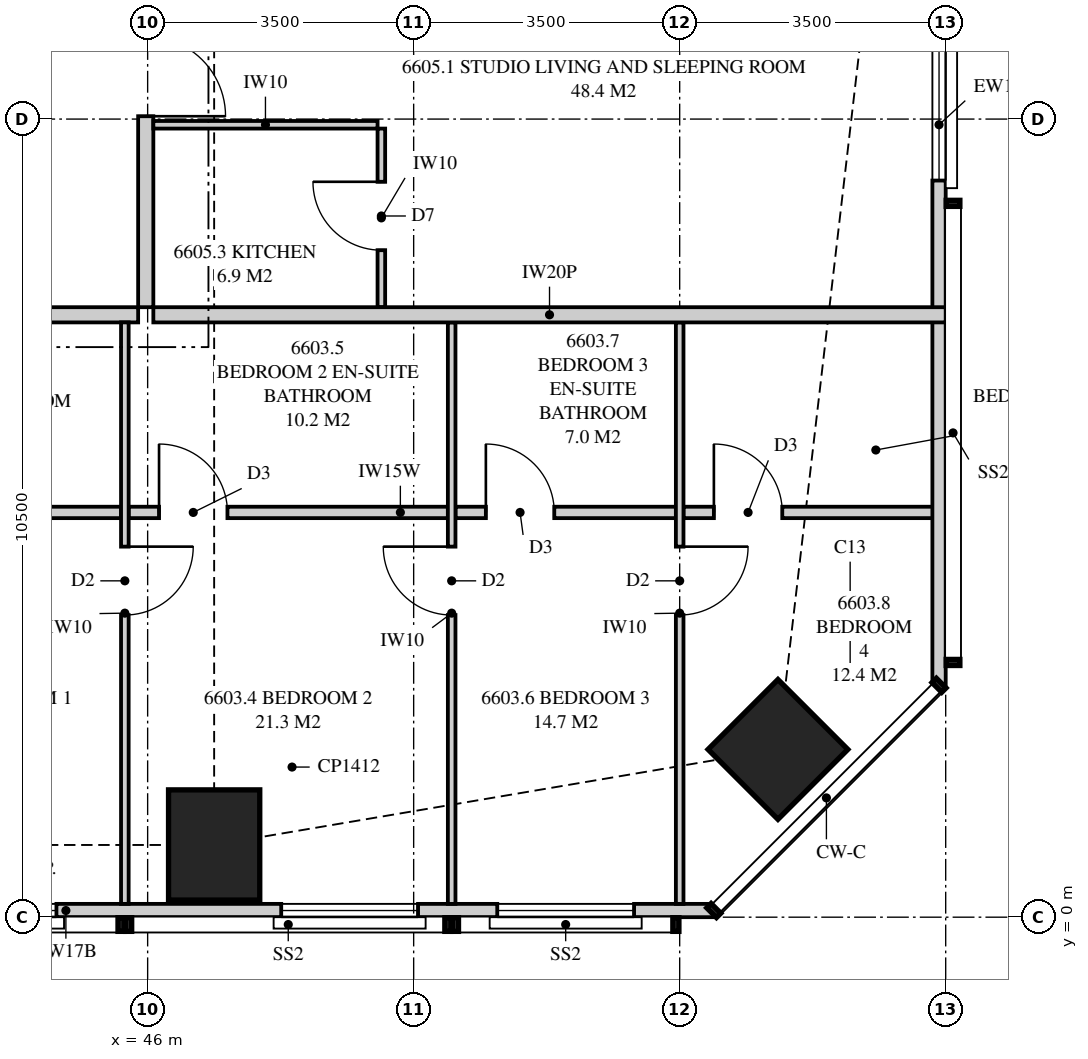
"""IFC4 building model, lengths in metres.
Left out: names, types, materials, properties, quantities, classifications, styles, units other than length and angle.
Written with IfcOpenShell. Run it as: python <this file> out.ifc"""

import sys

from ifc_helpers import new_model, si_unit, direction, frame, frame_2d, origin, origin_2d, place, context, subcontext, project, spatial, polyline, rectangle, outline, extrude, element, fill, save


model = new_model("IFC4")
c1 = context("Model", 3, precision=1e-05, world=origin(), true_north=direction((0.0, 1.0)))
c2 = subcontext(c1, "Body", "Model", "MODEL_VIEW")
j1 = project(units=[si_unit("LENGTHUNIT", "METRE"), si_unit("PLANEANGLEUNIT", "RADIAN")], contexts=[c1])
p1 = place(None, origin())
s1 = spatial("IfcSite", under=j1, at=p1, CompositionType="ELEMENT")
p2 = place(p1, origin())
s2 = spatial("IfcBuilding", under=s1, at=p2, CompositionType="ELEMENT")
p3 = place(p2, frame((0.0, 0.0, 242.45)))
s3 = spatial("IfcBuildingStorey", under=s2, at=p3, CompositionType="ELEMENT", Elevation=242.45)
p4 = place(p3, frame((46.875, 0.95, 0.0), z_axis=(0.0, 0.0, 1.0), x_axis=(0.0, 1.0, 0.0)))
e1 = element("IfcColumn", 1, at=p4, inside=s3, PredefinedType="COLUMN", context=c2, shape_type="SweptSolid", body=[
    extrude(rectangle(XDim=1.45, YDim=1.2, at=origin_2d()), origin(), (0.0, 0.0, 1.0), 3.5),
])
p5 = place(p3, frame((54.293, 2.207, 0.0), z_axis=(0.0, 0.0, 1.0), x_axis=(0.707106781187, 0.707106781187, 0.0)))
e2 = element("IfcColumn", 2, at=p5, inside=s3, PredefinedType="COLUMN", context=c2, shape_type="SweptSolid", body=[
    extrude(rectangle(XDim=1.3, YDim=1.3, at=origin_2d()), origin(), (0.0, 0.0, 1.0), 3.5),
])
p6 = place(p3, frame((36.4, 0.087, 0.0), z_axis=(0.0, 0.0, 1.0), x_axis=(1.0, 0.0, 0.0)))
e3 = element("IfcWall", 3, at=p6, inside=s3, PredefinedType="SOLIDWALL", context=c2, shape_type="SweptSolid", body=[
    extrude(outline(polyline([(0.0, 0.0), (17.049, 0.0), (17.049, 3.26), (10.69, 3.26), (10.69, 2.3), (10.606, 2.3), (10.606, 3.26), (10.475, 3.26), (10.475, 2.3), (0.0, 2.3), (0.0, 0.0)])), frame((0.0, 0.087, 0.0), z_axis=(0.0, -1.0, 0.0), x_axis=(1.0, 0.0, 0.0)), (0.0, 0.0, 1.0), 0.175),
])
p7 = place(p6, frame((1.76, 0.0, 0.4)))
e4 = element("IfcOpeningElement", 4, at=p7, cuts=e3, PredefinedType="OPENING", context=c2, shape_type="SweptSolid", body=[
    extrude(rectangle(XDim=2.4, YDim=1.85, at=frame_2d((1.2, 0.925))), frame((0.0, 0.097, 0.0), z_axis=(0.0, -1.0, 0.0), x_axis=(1.0, 0.0, 0.0)), (0.0, 0.0, 1.0), 0.195),
])
p8 = place(p6, frame((6.6, 0.0, 0.4)))
e5 = element("IfcOpeningElement", 5, at=p8, cuts=e3, PredefinedType="OPENING", context=c2, shape_type="SweptSolid", body=[
    extrude(rectangle(XDim=1.8, YDim=1.85, at=frame_2d((0.9, 0.925))), frame((0.0, 0.097, 0.0), z_axis=(0.0, -1.0, 0.0), x_axis=(1.0, 0.0, 0.0)), (0.0, 0.0, 1.0), 0.195),
])
p9 = place(p6, frame((11.357, 0.0, 0.4)))
e6 = element("IfcOpeningElement", 6, at=p9, cuts=e3, PredefinedType="OPENING", context=c2, shape_type="SweptSolid", body=[
    extrude(rectangle(XDim=1.8, YDim=1.85, at=frame_2d((0.9, 0.925))), frame((0.0, 0.097, 0.0), z_axis=(0.0, -1.0, 0.0), x_axis=(1.0, 0.0, 0.0)), (0.0, 0.0, 1.0), 0.195),
])
p10 = place(p6, frame((14.2, 0.0, 0.4)))
e7 = element("IfcOpeningElement", 7, at=p10, cuts=e3, PredefinedType="OPENING", context=c2, shape_type="SweptSolid", body=[
    extrude(rectangle(XDim=1.8, YDim=1.85, at=frame_2d((0.9, 0.925))), frame((0.0, 0.097, 0.0), z_axis=(0.0, -1.0, 0.0), x_axis=(1.0, 0.0, 0.0)), (0.0, 0.0, 1.0), 0.195),
])
p11 = place(p3, frame((56.413, 3.051, 0.0), z_axis=(0.0, 0.0, 1.0), x_axis=(0.0, 1.0, 0.0)))
e8 = element("IfcWall", 8, at=p11, inside=s3, PredefinedType="SOLIDWALL", context=c2, shape_type="SweptSolid", body=[
    extrude(outline(polyline([(0.0, 0.0), (14.749, 0.0), (14.749, 2.3), (9.949, 2.3), (9.949, 3.26), (9.858, 3.26), (9.858, 2.3), (9.688, 2.3), (9.688, 3.26), (0.0, 3.26), (0.0, 0.0)])), frame((0.0, 0.087, 0.0), z_axis=(0.0, -1.0, 0.0), x_axis=(1.0, 0.0, 0.0)), (0.0, 0.0, 1.0), 0.175),
])
p12 = place(p11, frame((6.64, 0.0, 0.4)))
e9 = element("IfcOpeningElement", 9, at=p12, cuts=e8, PredefinedType="OPENING", context=c2, shape_type="SweptSolid", body=[
    extrude(rectangle(XDim=2.4, YDim=1.85, at=frame_2d((1.2, 0.925))), frame((0.0, 0.097, 0.0), z_axis=(0.0, -1.0, 0.0), x_axis=(1.0, 0.0, 0.0)), (0.0, 0.0, 1.0), 0.195),
])
p13 = place(p11, frame((11.999, 0.0, 0.4)))
e10 = element("IfcOpeningElement", 10, at=p13, cuts=e8, PredefinedType="OPENING", context=c2, shape_type="SweptSolid", body=[
    extrude(rectangle(XDim=1.8, YDim=1.85, at=frame_2d((0.9, 0.925))), frame((0.0, 0.097, 0.0), z_axis=(0.0, -1.0, 0.0), x_axis=(1.0, 0.0, 0.0)), (0.0, 0.0, 1.0), 0.195),
])
p14 = place(p3, frame((36.55, 7.925, 0.0), z_axis=(0.0, 0.0, 1.0), x_axis=(1.0, 0.0, 0.0)))
e11 = element("IfcWall", 11, at=p14, inside=s3, PredefinedType="PARTITIONING", context=c2, shape_type="SweptSolid", body=[
    extrude(outline(polyline([(0.0, 0.0), (9.325, 0.0), (9.325, 3.26), (9.325, 2.66), (9.015, 2.66), (9.015, 3.26), (2.01, 3.26), (2.01, 2.66), (0.0, 2.66), (0.0, 3.26), (0.0, 0.0)])), frame((0.0, 0.1, 0.0), z_axis=(0.0, -1.0, 0.0), x_axis=(1.0, 0.0, 0.0)), (0.0, 0.0, 1.0), 0.2),
])
p15 = place(p14, frame((4.15, 0.0, 0.0)))
e12 = element("IfcOpeningElement", 12, at=p15, cuts=e11, PredefinedType="OPENING", context=c2, shape_type="SweptSolid", body=[
    extrude(rectangle(XDim=1.05, YDim=2.2, at=frame_2d((0.525, 1.1))), frame((0.0, 0.11, 0.0), z_axis=(0.0, -1.0, 0.0), x_axis=(1.0, 0.0, 0.0)), (0.0, 0.0, 1.0), 0.22),
])
p16 = place(p3, frame((45.7, 0.175, 0.0), z_axis=(0.0, 0.0, 1.0), x_axis=(0.0, 1.0, 0.0)))
e13 = element("IfcWall", 13, at=p16, inside=s3, PredefinedType="PARTITIONING", context=c2, shape_type="SweptSolid", body=[
    extrude(outline(polyline([(0.0, 0.0), (7.65, 0.0), (7.65, 3.26), (7.65, 2.66), (1.635, 2.66), (1.635, 2.3), (0.0, 2.3), (0.0, 3.26), (0.0, 0.0)])), frame((0.0, 0.05, 0.0), z_axis=(0.0, -1.0, 0.0), x_axis=(1.0, 0.0, 0.0)), (0.0, 0.0, 1.0), 0.1),
])
p17 = place(p16, frame((3.8, 0.0, 0.0)))
e14 = element("IfcOpeningElement", 14, at=p17, cuts=e13, PredefinedType="OPENING", context=c2, shape_type="SweptSolid", body=[
    extrude(rectangle(XDim=0.9, YDim=2.1, at=frame_2d((0.45, 1.05))), frame((0.0, 0.06, 0.0), z_axis=(0.0, -1.0, 0.0), x_axis=(1.0, 0.0, 0.0)), (0.0, 0.0, 1.0), 0.12),
])
p18 = place(p3, frame((50.0, 0.175, 0.0), z_axis=(0.0, 0.0, 1.0), x_axis=(0.0, 1.0, 0.0)))
e15 = element("IfcWall", 15, at=p18, inside=s3, PredefinedType="PARTITIONING", context=c2, shape_type="SweptSolid", body=[
    extrude(outline(polyline([(0.0, 0.0), (7.65, 0.0), (7.65, 3.26), (2.177, 3.26), (2.177, 2.3), (0.432, 2.3), (0.432, 3.26), (0.0, 3.26), (0.0, 0.0)])), frame((0.0, 0.05, 0.0), z_axis=(0.0, -1.0, 0.0), x_axis=(1.0, 0.0, 0.0)), (0.0, 0.0, 1.0), 0.1),
])
p19 = place(p18, frame((3.8, 0.0, 0.0)))
e16 = element("IfcOpeningElement", 16, at=p19, cuts=e15, PredefinedType="OPENING", context=c2, shape_type="SweptSolid", body=[
    extrude(rectangle(XDim=0.9, YDim=2.1, at=frame_2d((0.45, 1.05))), frame((0.0, 0.06, 0.0), z_axis=(0.0, -1.0, 0.0), x_axis=(1.0, 0.0, 0.0)), (0.0, 0.0, 1.0), 0.12),
])
p20 = place(p3, frame((53.0, 0.175, 0.0), z_axis=(0.0, 0.0, 1.0), x_axis=(0.0, 1.0, 0.0)))
e17 = element("IfcWall", 17, at=p20, inside=s3, PredefinedType="PARTITIONING", context=c2, shape_type="SweptSolid", body=[
    extrude(outline(polyline([(0.0, 0.0), (7.65, 0.0), (7.65, 3.26), (2.685, 3.26), (2.685, 2.3), (0.941, 2.3), (0.941, 3.26), (0.0, 3.26), (0.0, 0.0)])), frame((0.0, 0.05, 0.0), z_axis=(0.0, -1.0, 0.0), x_axis=(1.0, 0.0, 0.0)), (0.0, 0.0, 1.0), 0.1),
])
p21 = place(p20, frame((3.8, 0.0, 0.0)))
e18 = element("IfcOpeningElement", 18, at=p21, cuts=e17, PredefinedType="OPENING", context=c2, shape_type="SweptSolid", body=[
    extrude(rectangle(XDim=0.9, YDim=2.1, at=frame_2d((0.45, 1.05))), frame((0.0, 0.06, 0.0), z_axis=(0.0, -1.0, 0.0), x_axis=(1.0, 0.0, 0.0)), (0.0, 0.0, 1.0), 0.12),
])
p22 = place(p3, frame((42.15, 5.325, 0.0), z_axis=(0.0, 0.0, 1.0), x_axis=(1.0, 0.0, 0.0)))
e19 = element("IfcWall", 19, at=p22, inside=s3, PredefinedType="PLUMBINGWALL", context=c2, shape_type="SweptSolid", body=[
    extrude(outline(polyline([(0.0, 0.0), (3.5, 0.0), (3.5, 3.26), (3.5, 2.66), (3.44, 2.66), (3.44, 3.26), (0.0, 3.26), (0.0, 0.0)])), frame((0.0, 0.075, 0.0), z_axis=(0.0, -1.0, 0.0), x_axis=(1.0, 0.0, 0.0)), (0.0, 0.0, 1.0), 0.15),
])
p23 = place(p3, frame((45.75, 5.325, 0.0), z_axis=(0.0, 0.0, 1.0), x_axis=(1.0, 0.0, 0.0)))
e20 = element("IfcWall", 20, at=p23, inside=s3, PredefinedType="PLUMBINGWALL", context=c2, shape_type="SweptSolid", body=[
    extrude(outline(polyline([(0.0, 0.0), (4.2, 0.0), (4.2, 3.26), (2.41, 3.26), (2.41, 2.66), (0.0, 2.66), (0.0, 3.26), (0.0, 0.0)])), frame((0.0, 0.075, 0.0), z_axis=(0.0, -1.0, 0.0), x_axis=(1.0, 0.0, 0.0)), (0.0, 0.0, 1.0), 0.15),
])
p24 = place(p23, frame((0.4, 0.0, 0.0)))
e21 = element("IfcOpeningElement", 21, at=p24, cuts=e20, PredefinedType="OPENING", context=c2, shape_type="SweptSolid", body=[
    extrude(rectangle(XDim=0.9, YDim=2.1, at=frame_2d((0.45, 1.05))), frame((0.0, 0.085, 0.0), z_axis=(0.0, -1.0, 0.0), x_axis=(1.0, 0.0, 0.0)), (0.0, 0.0, 1.0), 0.17),
])
p25 = place(p3, frame((50.05, 5.325, 0.0), z_axis=(0.0, 0.0, 1.0), x_axis=(1.0, 0.0, 0.0)))
e22 = element("IfcWall", 22, at=p25, inside=s3, PredefinedType="PLUMBINGWALL", context=c2, shape_type="SweptSolid", body=[
    extrude(rectangle(XDim=2.9, YDim=0.15, at=frame_2d((1.45, 0.0))), origin(), (0.0, 0.0, 1.0), 3.26),
])
p26 = place(p25, frame((0.4, 0.0, 0.0)))
e23 = element("IfcOpeningElement", 23, at=p26, cuts=e22, PredefinedType="OPENING", context=c2, shape_type="SweptSolid", body=[
    extrude(rectangle(XDim=0.9, YDim=2.1, at=frame_2d((0.45, 1.05))), frame((0.0, 0.085, 0.0), z_axis=(0.0, -1.0, 0.0), x_axis=(1.0, 0.0, 0.0)), (0.0, 0.0, 1.0), 0.17),
])
p27 = place(p3, frame((53.05, 5.325, 0.0), z_axis=(0.0, 0.0, 1.0), x_axis=(1.0, 0.0, 0.0)))
e24 = element("IfcWall", 24, at=p27, inside=s3, PredefinedType="PLUMBINGWALL", context=c2, shape_type="SweptSolid", body=[
    extrude(outline(polyline([(0.0, 0.0), (3.45, 0.0), (3.45, 3.26), (2.497, 3.26), (2.497, 2.3), (0.715, 2.3), (0.715, 3.26), (0.0, 3.26), (0.0, 0.0)])), frame((0.0, 0.075, 0.0), z_axis=(0.0, -1.0, 0.0), x_axis=(1.0, 0.0, 0.0)), (0.0, 0.0, 1.0), 0.15),
])
p28 = place(p27, frame((0.4, 0.0, 0.0)))
e25 = element("IfcOpeningElement", 25, at=p28, cuts=e24, PredefinedType="OPENING", context=c2, shape_type="SweptSolid", body=[
    extrude(rectangle(XDim=0.9, YDim=2.1, at=frame_2d((0.45, 1.05))), frame((0.0, 0.085, 0.0), z_axis=(0.0, -1.0, 0.0), x_axis=(1.0, 0.0, 0.0)), (0.0, 0.0, 1.0), 0.17),
])
p29 = place(p3, frame((46.075, 7.925, 0.0), z_axis=(0.0, 0.0, 1.0), x_axis=(1.0, 0.0, 0.0)))
e26 = element("IfcWall", 26, at=p29, inside=s3, PredefinedType="PARTITIONING", context=c2, shape_type="SweptSolid", body=[
    extrude(outline(polyline([(0.0, 0.0), (10.425, 0.0), (10.425, 3.26), (9.8, 3.26), (9.8, 2.3), (7.968, 2.3), (7.968, 3.26), (2.11, 3.26), (2.11, 2.66), (0.0, 2.66), (0.0, 3.26), (0.0, 0.0)])), frame((0.0, 0.1, 0.0), z_axis=(0.0, -1.0, 0.0), x_axis=(1.0, 0.0, 0.0)), (0.0, 0.0, 1.0), 0.2),
])
p30 = place(p3, frame((45.975, 8.025, 0.0), z_axis=(0.0, 0.0, 1.0), x_axis=(0.0, 1.0, 0.0)))
e27 = element("IfcWall", 27, at=p30, inside=s3, PredefinedType="PARTITIONING", context=c2, shape_type="SweptSolid", body=[
    extrude(outline(polyline([(0.0, 0.0), (6.025, 0.0), (6.025, 3.26), (6.025, 2.66), (5.085, 2.66), (0.0, 2.66), (0.0, 3.26), (0.0, 0.0)])), frame((0.0, 0.1, 0.0), z_axis=(0.0, -1.0, 0.0), x_axis=(1.0, 0.0, 0.0)), (0.0, 0.0, 1.0), 0.2),
])
p31 = place(p30, frame((2.512, 0.0, 0.0)))
e28 = element("IfcOpeningElement", 28, at=p31, cuts=e27, PredefinedType="OPENING", context=c2, shape_type="SweptSolid", body=[
    extrude(rectangle(XDim=1.05, YDim=2.2, at=frame_2d((0.525, 1.1))), frame((0.0, 0.11, 0.0), z_axis=(0.0, -1.0, 0.0), x_axis=(1.0, 0.0, 0.0)), (0.0, 0.0, 1.0), 0.22),
])
p32 = place(p3, frame((49.075, 8.025, 0.0), z_axis=(0.0, 0.0, 1.0), x_axis=(0.0, 1.0, 0.0)))
e29 = element("IfcWall", 29, at=p32, inside=s3, PredefinedType="PARTITIONING", context=c2, shape_type="SweptSolid", body=[
    extrude(rectangle(XDim=2.35, YDim=0.1, at=frame_2d((1.175, 0.0))), origin(), (0.0, 0.0, 1.0), 3.26),
])
p33 = place(p32, frame((0.75, 0.0, 0.0)))
e30 = element("IfcOpeningElement", 30, at=p33, cuts=e29, PredefinedType="OPENING", context=c2, shape_type="SweptSolid", body=[
    extrude(rectangle(XDim=0.9, YDim=2.1, at=frame_2d((0.45, 1.05))), frame((0.0, 0.06, 0.0), z_axis=(0.0, -1.0, 0.0), x_axis=(1.0, 0.0, 0.0)), (0.0, 0.0, 1.0), 0.12),
])
p34 = place(p3, frame((49.025, 10.425, 0.0), z_axis=(0.0, 0.0, 1.0), x_axis=(-1.0, 0.0, 0.0)))
e31 = element("IfcWall", 31, at=p34, inside=s3, PredefinedType="PARTITIONING", context=c2, shape_type="SweptSolid", body=[
    extrude(outline(polyline([(0.0, 0.0), (2.95, 0.0), (2.95, 3.26), (2.95, 2.66), (0.89, 2.66), (0.89, 3.26), (0.0, 3.26), (0.0, 0.0)])), frame((0.0, 0.05, 0.0), z_axis=(0.0, -1.0, 0.0), x_axis=(1.0, 0.0, 0.0)), (0.0, 0.0, 1.0), 0.1),
])
p35 = place(p8, origin())
e32 = element("IfcWindow", 32, at=p35, inside=s3, PartitioningType="SINGLE_PANEL", PredefinedType="WINDOW", context=c2, shape_type="SweptSolid", body=[
    extrude(rectangle(XDim=1.8, YDim=1.85, at=frame_2d((0.9, 0.925))), frame((0.0, 0.03, 0.0), z_axis=(0.0, -1.0, 0.0), x_axis=(1.0, 0.0, 0.0)), (0.0, 0.0, 1.0), 0.06),
])
fill(e5, e32)
p36 = place(p9, origin())
e33 = element("IfcWindow", 33, at=p36, inside=s3, PartitioningType="SINGLE_PANEL", PredefinedType="WINDOW", context=c2, shape_type="SweptSolid", body=[
    extrude(rectangle(XDim=1.8, YDim=1.85, at=frame_2d((0.9, 0.925))), frame((0.0, 0.03, 0.0), z_axis=(0.0, -1.0, 0.0), x_axis=(1.0, 0.0, 0.0)), (0.0, 0.0, 1.0), 0.06),
])
fill(e6, e33)
p37 = place(p10, origin())
e34 = element("IfcWindow", 34, at=p37, inside=s3, PartitioningType="SINGLE_PANEL", PredefinedType="WINDOW", context=c2, shape_type="SweptSolid", body=[
    extrude(rectangle(XDim=1.8, YDim=1.85, at=frame_2d((0.9, 0.925))), frame((0.0, 0.03, 0.0), z_axis=(0.0, -1.0, 0.0), x_axis=(1.0, 0.0, 0.0)), (0.0, 0.0, 1.0), 0.06),
])
fill(e7, e34)
p38 = place(p12, origin())
e35 = element("IfcWindow", 35, at=p38, inside=s3, PartitioningType="SINGLE_PANEL", PredefinedType="WINDOW", context=c2, shape_type="SweptSolid", body=[
    extrude(rectangle(XDim=2.4, YDim=1.85, at=frame_2d((1.2, 0.925))), frame((0.0, 0.03, 0.0), z_axis=(0.0, -1.0, 0.0), x_axis=(1.0, 0.0, 0.0)), (0.0, 0.0, 1.0), 0.06),
])
fill(e9, e35)
p39 = place(p17, frame((0.9, 0.0, 0.0), z_axis=(0.0, 0.0, 1.0), x_axis=(-1.0, 0.0, 0.0)))
e36 = element("IfcDoor", 36, at=p39, inside=s3, OperationType="SINGLE_SWING_LEFT", PredefinedType="DOOR", context=c2, shape_type="SweptSolid", body=[
    extrude(rectangle(XDim=0.9, YDim=2.1, at=frame_2d((0.45, 1.05))), frame((0.0, 0.025, 0.0), z_axis=(0.0, -1.0, 0.0), x_axis=(1.0, 0.0, 0.0)), (0.0, 0.0, 1.0), 0.05),
])
fill(e14, e36)
p40 = place(p24, origin())
e37 = element("IfcDoor", 37, at=p40, inside=s3, OperationType="SINGLE_SWING_LEFT", PredefinedType="DOOR", context=c2, shape_type="SweptSolid", body=[
    extrude(rectangle(XDim=0.9, YDim=2.1, at=frame_2d((0.45, 1.05))), frame((0.0, 0.025, 0.0), z_axis=(0.0, -1.0, 0.0), x_axis=(1.0, 0.0, 0.0)), (0.0, 0.0, 1.0), 0.05),
])
fill(e21, e37)
p41 = place(p19, origin())
e38 = element("IfcDoor", 38, at=p41, inside=s3, OperationType="SINGLE_SWING_RIGHT", PredefinedType="DOOR", context=c2, shape_type="SweptSolid", body=[
    extrude(rectangle(XDim=0.9, YDim=2.1, at=frame_2d((0.45, 1.05))), frame((0.0, 0.025, 0.0), z_axis=(0.0, -1.0, 0.0), x_axis=(1.0, 0.0, 0.0)), (0.0, 0.0, 1.0), 0.05),
])
fill(e16, e38)
p42 = place(p26, origin())
e39 = element("IfcDoor", 39, at=p42, inside=s3, OperationType="SINGLE_SWING_LEFT", PredefinedType="DOOR", context=c2, shape_type="SweptSolid", body=[
    extrude(rectangle(XDim=0.9, YDim=2.1, at=frame_2d((0.45, 1.05))), frame((0.0, 0.025, 0.0), z_axis=(0.0, -1.0, 0.0), x_axis=(1.0, 0.0, 0.0)), (0.0, 0.0, 1.0), 0.05),
])
fill(e23, e39)
p43 = place(p21, frame((0.9, 0.0, 0.0), z_axis=(0.0, 0.0, 1.0), x_axis=(-1.0, 0.0, 0.0)))
e40 = element("IfcDoor", 40, at=p43, inside=s3, OperationType="SINGLE_SWING_LEFT", PredefinedType="DOOR", context=c2, shape_type="SweptSolid", body=[
    extrude(rectangle(XDim=0.9, YDim=2.1, at=frame_2d((0.45, 1.05))), frame((0.0, 0.025, 0.0), z_axis=(0.0, -1.0, 0.0), x_axis=(1.0, 0.0, 0.0)), (0.0, 0.0, 1.0), 0.05),
])
fill(e18, e40)
p44 = place(p28, origin())
e41 = element("IfcDoor", 41, at=p44, inside=s3, OperationType="SINGLE_SWING_LEFT", PredefinedType="DOOR", context=c2, shape_type="SweptSolid", body=[
    extrude(rectangle(XDim=0.9, YDim=2.1, at=frame_2d((0.45, 1.05))), frame((0.0, 0.025, 0.0), z_axis=(0.0, -1.0, 0.0), x_axis=(1.0, 0.0, 0.0)), (0.0, 0.0, 1.0), 0.05),
])
fill(e25, e41)
p45 = place(p31, frame((1.05, 0.0, 0.0), z_axis=(0.0, 0.0, 1.0), x_axis=(-1.0, 0.0, 0.0)))
e42 = element("IfcDoor", 42, at=p45, inside=s3, OperationType="SINGLE_SWING_RIGHT", PredefinedType="DOOR", context=c2, shape_type="SweptSolid", body=[
    extrude(rectangle(XDim=1.05, YDim=2.2, at=frame_2d((0.525, 1.1))), frame((0.0, 0.025, 0.0), z_axis=(0.0, -1.0, 0.0), x_axis=(1.0, 0.0, 0.0)), (0.0, 0.0, 1.0), 0.05),
])
fill(e28, e42)
p46 = place(p33, origin())
e43 = element("IfcDoor", 43, at=p46, inside=s3, OperationType="SINGLE_SWING_RIGHT", PredefinedType="DOOR", context=c2, shape_type="SweptSolid", body=[
    extrude(rectangle(XDim=0.9, YDim=2.1, at=frame_2d((0.45, 1.05))), frame((0.0, 0.025, 0.0), z_axis=(0.0, -1.0, 0.0), x_axis=(1.0, 0.0, 0.0)), (0.0, 0.0, 1.0), 0.05),
])
fill(e30, e43)
save(model, sys.argv[1])
